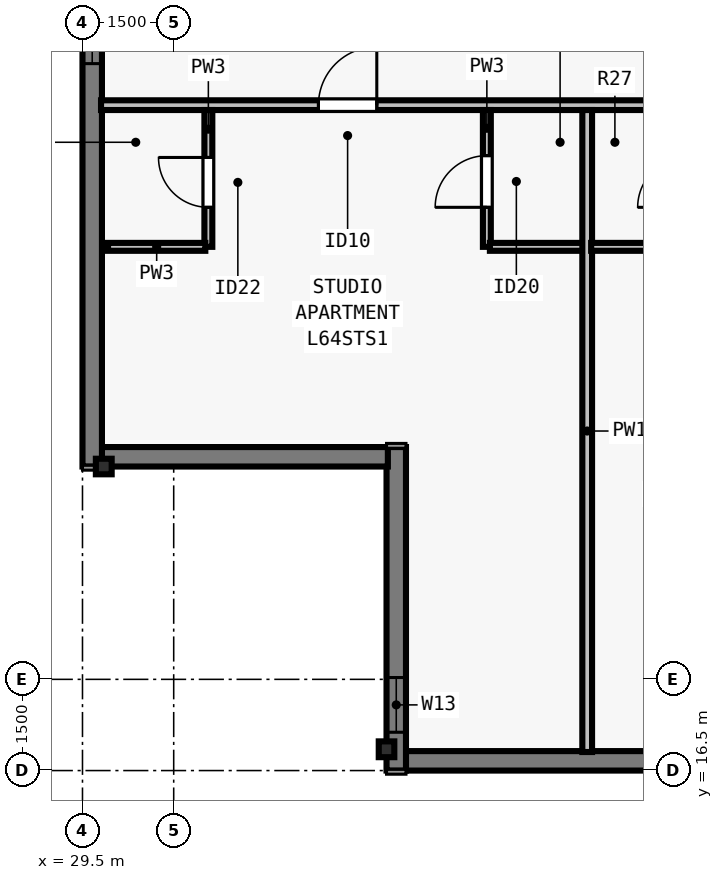
"""IFC4 building model, lengths in metres.
Left out: names, types, materials, properties, quantities, classifications, styles, units other than length and angle.
Written with IfcOpenShell. Run it as: python <this file> out.ifc"""

import sys

from ifc_helpers import new_model, si_unit, direction, frame, frame_2d, origin, origin_2d, place, context, subcontext, project, spatial, rectangle, i_section, extrude, element, fill, save


model = new_model("IFC4")
c1 = context("Model", 3, precision=1e-05, world=origin(), true_north=direction((0.0, 1.0)))
c2 = subcontext(c1, "Body", "Model", "MODEL_VIEW")
j1 = project(units=[si_unit("LENGTHUNIT", "METRE"), si_unit("PLANEANGLEUNIT", "RADIAN")], contexts=[c1])
p1 = place(None, origin())
s1 = spatial("IfcSite", under=j1, at=p1, CompositionType="ELEMENT")
p2 = place(p1, origin())
s2 = spatial("IfcBuilding", under=s1, at=p2, CompositionType="ELEMENT")
p3 = place(p2, frame((0.0, 0.0, 234.0)))
s3 = spatial("IfcBuildingStorey", under=s2, at=p3, CompositionType="ELEMENT", Elevation=234.0)
for number, where, z_axis, x_axis in (
    (1, (34.5, 16.85, 0.0), (0.0, 0.0, 1.0), (1.0, 0.0, 0.0)),
    (2, (29.85, 21.5, 0.0), (0.0, 0.0, 1.0), (0.0, 1.0, 0.0)),
):
    element("IfcColumn", number, at=place(p3, frame(where, z_axis=z_axis, x_axis=x_axis)), inside=s3, PredefinedType="COLUMN", context=c2, shape_type="SweptSolid", body=[
        extrude(i_section(OverallWidth=0.256, OverallDepth=0.26, WebThickness=0.01, FlangeThickness=0.017, FilletRadius=0.013, at=origin_2d()), origin(), (0.0, 0.0, 1.0), 3.5),
    ])
p4 = place(p3, frame((69.5, 16.66, 0.0), z_axis=(0.0, 0.0, 1.0), x_axis=(-1.0, 0.0, 0.0)))
e3 = element("IfcWall", 3, at=p4, inside=s3, PredefinedType="SOLIDWALL", context=c2, shape_type="SweptSolid", body=[
    extrude(rectangle(XDim=34.702, YDim=0.32, at=frame_2d((17.351, 0.0))), origin(), (0.0, 0.0, 1.0), 3.29),
])
p5 = place(p4, frame((4.763, 0.0, 0.8)))
e4 = element("IfcOpeningElement", 4, at=p5, cuts=e3, PredefinedType="OPENING", context=c2, shape_type="SweptSolid", body=[
    extrude(rectangle(XDim=1.55, YDim=1.678, at=frame_2d((0.775, 0.839))), frame((0.0, 0.17, 0.0), z_axis=(0.0, -1.0, 0.0), x_axis=(1.0, 0.0, 0.0)), (0.0, 0.0, 1.0), 0.34),
])
p6 = place(p4, frame((7.988, 0.0, 0.8)))
e5 = element("IfcOpeningElement", 5, at=p6, cuts=e3, PredefinedType="OPENING", context=c2, shape_type="SweptSolid", body=[
    extrude(rectangle(XDim=1.85, YDim=1.678, at=frame_2d((0.925, 0.839))), frame((0.0, 0.17, 0.0), z_axis=(0.0, -1.0, 0.0), x_axis=(1.0, 0.0, 0.0)), (0.0, 0.0, 1.0), 0.34),
])
p7 = place(p4, frame((14.738, 0.0, 0.8)))
e6 = element("IfcOpeningElement", 6, at=p7, cuts=e3, PredefinedType="OPENING", context=c2, shape_type="SweptSolid", body=[
    extrude(rectangle(XDim=1.85, YDim=1.678, at=frame_2d((0.925, 0.839))), frame((0.0, 0.17, 0.0), z_axis=(0.0, -1.0, 0.0), x_axis=(1.0, 0.0, 0.0)), (0.0, 0.0, 1.0), 0.34),
])
p8 = place(p4, frame((18.264, 0.0, 0.8)))
e7 = element("IfcOpeningElement", 7, at=p8, cuts=e3, PredefinedType="OPENING", context=c2, shape_type="SweptSolid", body=[
    extrude(rectangle(XDim=1.55, YDim=1.678, at=frame_2d((0.775, 0.839))), frame((0.0, 0.17, 0.0), z_axis=(0.0, -1.0, 0.0), x_axis=(1.0, 0.0, 0.0)), (0.0, 0.0, 1.0), 0.34),
])
p9 = place(p4, frame((25.864, 0.0, 0.8)))
e8 = element("IfcOpeningElement", 8, at=p9, cuts=e3, PredefinedType="OPENING", context=c2, shape_type="SweptSolid", body=[
    extrude(rectangle(XDim=1.55, YDim=1.678, at=frame_2d((0.775, 0.839))), frame((0.0, 0.17, 0.0), z_axis=(0.0, -1.0, 0.0), x_axis=(1.0, 0.0, 0.0)), (0.0, 0.0, 1.0), 0.34),
])
p10 = place(p4, frame((28.24, 0.0, 0.8)))
e9 = element("IfcOpeningElement", 9, at=p10, cuts=e3, PredefinedType="OPENING", context=c2, shape_type="SweptSolid", body=[
    extrude(rectangle(XDim=1.85, YDim=1.678, at=frame_2d((0.925, 0.839))), frame((0.0, 0.17, 0.0), z_axis=(0.0, -1.0, 0.0), x_axis=(1.0, 0.0, 0.0)), (0.0, 0.0, 1.0), 0.34),
])
p11 = place(p3, frame((34.66, 16.5, 0.0), z_axis=(0.0, 0.0, 1.0), x_axis=(0.0, 1.0, 0.0)))
e10 = element("IfcWall", 10, at=p11, inside=s3, PredefinedType="SOLIDWALL", context=c2, shape_type="SweptSolid", body=[
    extrude(rectangle(XDim=5.32, YDim=0.32, at=frame_2d((2.66, 0.0))), origin(), (0.0, 0.0, 1.0), 3.29),
])
p12 = place(p11, frame((0.63, 0.0, 0.8)))
e11 = element("IfcOpeningElement", 11, at=p12, cuts=e10, PredefinedType="OPENING", context=c2, shape_type="SweptSolid", body=[
    extrude(rectangle(XDim=0.9, YDim=1.678, at=frame_2d((0.45, 0.839))), frame((0.0, 0.17, 0.0), z_axis=(0.0, -1.0, 0.0), x_axis=(1.0, 0.0, 0.0)), (0.0, 0.0, 1.0), 0.34),
])
p13 = place(p3, frame((34.522, 21.66, 0.0), z_axis=(0.0, 0.0, 1.0), x_axis=(-1.0, 0.0, 0.0)))
e12 = element("IfcWall", 12, at=p13, inside=s3, PredefinedType="SOLIDWALL", context=c2, shape_type="SweptSolid", body=[
    extrude(rectangle(XDim=4.724, YDim=0.32, at=frame_2d((2.362, 0.0))), origin(), (0.0, 0.0, 1.0), 3.29),
])
p14 = place(p3, frame((29.66, 21.5, 0.0), z_axis=(0.0, 0.0, 1.0), x_axis=(0.0, 1.0, 0.0)))
e13 = element("IfcWall", 13, at=p14, inside=s3, PredefinedType="SOLIDWALL", context=c2, shape_type="SweptSolid", body=[
    extrude(rectangle(XDim=24.202, YDim=0.32, at=frame_2d((12.101, 0.0))), origin(), (0.0, 0.0, 1.0), 3.29),
])
p15 = place(p14, frame((6.625, 0.0, 0.8)))
e14 = element("IfcOpeningElement", 14, at=p15, cuts=e13, PredefinedType="OPENING", context=c2, shape_type="SweptSolid", body=[
    extrude(rectangle(XDim=1.85, YDim=1.678, at=frame_2d((0.925, 0.839))), frame((0.0, 0.17, 0.0), z_axis=(0.0, -1.0, 0.0), x_axis=(1.0, 0.0, 0.0)), (0.0, 0.0, 1.0), 0.34),
])
p16 = place(p14, frame((10.476, 0.0, 0.8)))
e15 = element("IfcOpeningElement", 15, at=p16, cuts=e13, PredefinedType="OPENING", context=c2, shape_type="SweptSolid", body=[
    extrude(rectangle(XDim=1.55, YDim=1.678, at=frame_2d((0.775, 0.839))), frame((0.0, 0.17, 0.0), z_axis=(0.0, -1.0, 0.0), x_axis=(1.0, 0.0, 0.0)), (0.0, 0.0, 1.0), 0.34),
])
p17 = place(p14, frame((14.476, 0.0, 0.8)))
e16 = element("IfcOpeningElement", 16, at=p17, cuts=e13, PredefinedType="OPENING", context=c2, shape_type="SweptSolid", body=[
    extrude(rectangle(XDim=1.85, YDim=1.678, at=frame_2d((0.925, 0.839))), frame((0.0, 0.17, 0.0), z_axis=(0.0, -1.0, 0.0), x_axis=(1.0, 0.0, 0.0)), (0.0, 0.0, 1.0), 0.34),
])
p18 = place(p14, frame((18.777, 0.0, 0.8)))
e17 = element("IfcOpeningElement", 17, at=p18, cuts=e13, PredefinedType="OPENING", context=c2, shape_type="SweptSolid", body=[
    extrude(rectangle(XDim=1.55, YDim=1.678, at=frame_2d((0.775, 0.839))), frame((0.0, 0.17, 0.0), z_axis=(0.0, -1.0, 0.0), x_axis=(1.0, 0.0, 0.0)), (0.0, 0.0, 1.0), 0.34),
])
p19 = place(p3, frame((29.805, 27.442, 0.0), z_axis=(0.0, 0.0, 1.0), x_axis=(1.0, 0.0, 0.0)))
e18 = element("IfcWall", 18, at=p19, inside=s3, PredefinedType="PARTITIONING", context=c2, shape_type="SweptSolid", body=[
    extrude(rectangle(XDim=44.39, YDim=0.16, at=frame_2d((22.195, 0.0))), origin(), (0.0, 0.0, 1.0), 2.958),
])
p20 = place(p19, frame((3.575, 0.0, 0.0)))
e19 = element("IfcOpeningElement", 19, at=p20, cuts=e18, PredefinedType="OPENING", context=c2, shape_type="SweptSolid", body=[
    extrude(rectangle(XDim=0.96, YDim=2.18, at=frame_2d((0.48, 1.09))), frame((0.0, 0.09, 0.0), z_axis=(0.0, -1.0, 0.0), x_axis=(1.0, 0.0, 0.0)), (0.0, 0.0, 1.0), 0.18),
])
p21 = place(p19, frame((10.755, 0.0, 0.0)))
e20 = element("IfcOpeningElement", 20, at=p21, cuts=e18, PredefinedType="OPENING", context=c2, shape_type="SweptSolid", body=[
    extrude(rectangle(XDim=0.96, YDim=2.18, at=frame_2d((0.48, 1.09))), frame((0.0, 0.09, 0.0), z_axis=(0.0, -1.0, 0.0), x_axis=(1.0, 0.0, 0.0)), (0.0, 0.0, 1.0), 0.18),
])
p22 = place(p19, frame((18.115, 0.0, 0.0)))
e21 = element("IfcOpeningElement", 21, at=p22, cuts=e18, PredefinedType="OPENING", context=c2, shape_type="SweptSolid", body=[
    extrude(rectangle(XDim=0.96, YDim=2.18, at=frame_2d((0.48, 1.09))), frame((0.0, 0.09, 0.0), z_axis=(0.0, -1.0, 0.0), x_axis=(1.0, 0.0, 0.0)), (0.0, 0.0, 1.0), 0.18),
])
p23 = place(p19, frame((25.475, 0.0, 0.0)))
e22 = element("IfcOpeningElement", 22, at=p23, cuts=e18, PredefinedType="OPENING", context=c2, shape_type="SweptSolid", body=[
    extrude(rectangle(XDim=0.96, YDim=2.18, at=frame_2d((0.48, 1.09))), frame((0.0, 0.09, 0.0), z_axis=(0.0, -1.0, 0.0), x_axis=(1.0, 0.0, 0.0)), (0.0, 0.0, 1.0), 0.18),
])
p24 = place(p19, frame((32.835, 0.0, 0.0)))
e23 = element("IfcOpeningElement", 23, at=p24, cuts=e18, PredefinedType="OPENING", context=c2, shape_type="SweptSolid", body=[
    extrude(rectangle(XDim=0.96, YDim=2.18, at=frame_2d((0.48, 1.09))), frame((0.0, 0.09, 0.0), z_axis=(0.0, -1.0, 0.0), x_axis=(1.0, 0.0, 0.0)), (0.0, 0.0, 1.0), 0.18),
])
p25 = place(p19, frame((40.375, 0.0, 0.0)))
e24 = element("IfcOpeningElement", 24, at=p25, cuts=e18, PredefinedType="OPENING", context=c2, shape_type="SweptSolid", body=[
    extrude(rectangle(XDim=0.96, YDim=2.18, at=frame_2d((0.48, 1.09))), frame((0.0, 0.09, 0.0), z_axis=(0.0, -1.0, 0.0), x_axis=(1.0, 0.0, 0.0)), (0.0, 0.0, 1.0), 0.18),
])
p26 = place(p3, frame((31.57, 25.113, 0.0), z_axis=(0.0, 0.0, 1.0), x_axis=(0.0, 1.0, 0.0)))
e25 = element("IfcWall", 25, at=p26, inside=s3, PredefinedType="PLUMBINGWALL", context=c2, shape_type="SweptSolid", body=[
    extrude(rectangle(XDim=2.25, YDim=0.13, at=frame_2d((1.125, 0.0))), origin(), (0.0, 0.0, 1.0), 3.29),
])
p27 = place(p26, frame((0.65, 0.0, 0.0)))
e26 = element("IfcOpeningElement", 26, at=p27, cuts=e25, PredefinedType="OPENING", context=c2, shape_type="SweptSolid", body=[
    extrude(rectangle(XDim=0.82, YDim=2.1, at=frame_2d((0.41, 1.05))), frame((0.0, 0.075, 0.0), z_axis=(0.0, -1.0, 0.0), x_axis=(1.0, 0.0, 0.0)), (0.0, 0.0, 1.0), 0.15),
])
p28 = place(p3, frame((29.92, 25.113, 0.0), z_axis=(0.0, 0.0, 1.0), x_axis=(1.0, 0.0, 0.0)))
e27 = element("IfcWall", 27, at=p28, inside=s3, PredefinedType="PLUMBINGWALL", context=c2, shape_type="SweptSolid", body=[
    extrude(rectangle(XDim=1.6, YDim=0.13, at=frame_2d((0.8, 0.0))), origin(), (0.0, 0.0, 1.0), 3.29),
])
p29 = place(p3, frame((36.15, 25.113, 0.0), z_axis=(0.0, 0.0, 1.0), x_axis=(0.0, 1.0, 0.0)))
e28 = element("IfcWall", 28, at=p29, inside=s3, PredefinedType="PLUMBINGWALL", context=c2, shape_type="SweptSolid", body=[
    extrude(rectangle(XDim=2.25, YDim=0.13, at=frame_2d((1.125, 0.0))), origin(), (0.0, 0.0, 1.0), 3.29),
])
p30 = place(p29, frame((0.65, 0.0, 0.0)))
e29 = element("IfcOpeningElement", 29, at=p30, cuts=e28, PredefinedType="OPENING", context=c2, shape_type="SweptSolid", body=[
    extrude(rectangle(XDim=0.85, YDim=2.1, at=frame_2d((0.425, 1.05))), frame((0.0, 0.075, 0.0), z_axis=(0.0, -1.0, 0.0), x_axis=(1.0, 0.0, 0.0)), (0.0, 0.0, 1.0), 0.15),
])
p31 = place(p3, frame((36.2, 25.113, 0.0), z_axis=(0.0, 0.0, 1.0), x_axis=(1.0, 0.0, 0.0)))
e30 = element("IfcWall", 30, at=p31, inside=s3, PredefinedType="PLUMBINGWALL", context=c2, shape_type="SweptSolid", body=[
    extrude(rectangle(XDim=1.6, YDim=0.13, at=frame_2d((0.8, 0.0))), origin(), (0.0, 0.0, 1.0), 3.29),
])
p32 = place(p3, frame((37.8, 16.805, 0.0), z_axis=(0.0, 0.0, 1.0), x_axis=(0.0, 1.0, 0.0)))
e31 = element("IfcWall", 31, at=p32, inside=s3, PredefinedType="PARTITIONING", context=c2, shape_type="SweptSolid", body=[
    extrude(rectangle(XDim=10.558, YDim=0.16, at=frame_2d((5.279, 0.0))), origin(), (0.0, 0.0, 1.0), 2.573),
])
p33 = place(p3, frame((37.865, 25.113, 0.0), z_axis=(0.0, 0.0, 1.0), x_axis=(1.0, 0.0, 0.0)))
e32 = element("IfcWall", 32, at=p33, inside=s3, PredefinedType="PLUMBINGWALL", context=c2, shape_type="SweptSolid", body=[
    extrude(rectangle(XDim=1.535, YDim=0.13, at=frame_2d((0.768, 0.0))), origin(), (0.0, 0.0, 1.0), 3.29),
])
p34 = place(p15, origin())
e33 = element("IfcWindow", 33, at=p34, inside=s3, PartitioningType="SINGLE_PANEL", PredefinedType="WINDOW", context=c2, shape_type="SweptSolid", body=[
    extrude(rectangle(XDim=1.85, YDim=1.678, at=frame_2d((0.925, 0.839))), frame((0.0, -0.05, 0.0), z_axis=(0.0, -1.0, 0.0), x_axis=(1.0, 0.0, 0.0)), (0.0, 0.0, 1.0), 0.06),
])
fill(e14, e33)
p35 = place(p12, origin())
e34 = element("IfcWindow", 34, at=p35, inside=s3, PartitioningType="SINGLE_PANEL", PredefinedType="WINDOW", context=c2, shape_type="SweptSolid", body=[
    extrude(rectangle(XDim=0.9, YDim=1.678, at=frame_2d((0.45, 0.839))), frame((0.0, -0.04, 0.0), z_axis=(0.0, -1.0, 0.0), x_axis=(1.0, 0.0, 0.0)), (0.0, 0.0, 1.0), 0.06),
])
fill(e11, e34)
p36 = place(p27, origin())
e35 = element("IfcDoor", 35, at=p36, inside=s3, OperationType="SINGLE_SWING_RIGHT", PredefinedType="DOOR", context=c2, shape_type="SweptSolid", body=[
    extrude(rectangle(XDim=0.82, YDim=2.1, at=frame_2d((0.41, 1.05))), frame((0.0, 0.025, 0.0), z_axis=(0.0, -1.0, 0.0), x_axis=(1.0, 0.0, 0.0)), (0.0, 0.0, 1.0), 0.05),
])
fill(e26, e35)
p37 = place(p30, origin())
e36 = element("IfcDoor", 36, at=p37, inside=s3, OperationType="SINGLE_SWING_LEFT", PredefinedType="DOOR", context=c2, shape_type="SweptSolid", body=[
    extrude(rectangle(XDim=0.85, YDim=2.1, at=frame_2d((0.425, 1.05))), frame((0.0, 0.025, 0.0), z_axis=(0.0, -1.0, 0.0), x_axis=(1.0, 0.0, 0.0)), (0.0, 0.0, 1.0), 0.05),
])
fill(e29, e36)
p38 = place(p20, origin())
e37 = element("IfcDoor", 37, at=p38, inside=s3, OperationType="SINGLE_SWING_RIGHT", PredefinedType="DOOR", context=c2, shape_type="SweptSolid", body=[
    extrude(rectangle(XDim=0.96, YDim=2.18, at=frame_2d((0.48, 1.09))), frame((0.0, 0.025, 0.0), z_axis=(0.0, -1.0, 0.0), x_axis=(1.0, 0.0, 0.0)), (0.0, 0.0, 1.0), 0.05),
])
fill(e19, e37)
save(model, sys.argv[1])
